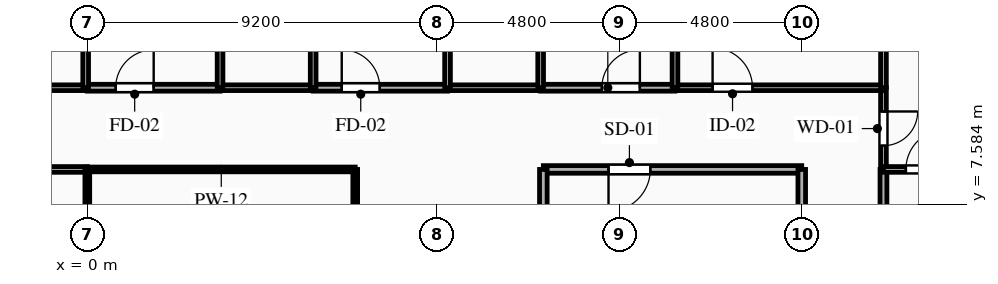
"""IFC4 building model, lengths in metres.
Left out: names, types, materials, properties, quantities, classifications, styles, units other than length and angle.
Written with IfcOpenShell. Run it as: python <this file> out.ifc"""

import sys

from ifc_helpers import new_model, si_unit, direction, frame, frame_2d, origin, place, context, subcontext, project, spatial, rectangle, extrude, element, fill, save


model = new_model("IFC4")
c1 = context("Model", 3, precision=1e-05, world=origin(), true_north=direction((0.0, 1.0)))
c2 = subcontext(c1, "Body", "Model", "MODEL_VIEW")
j1 = project(units=[si_unit("LENGTHUNIT", "METRE"), si_unit("PLANEANGLEUNIT", "RADIAN")], contexts=[c1])
p1 = place(None, origin())
s1 = spatial("IfcSite", under=j1, at=p1, CompositionType="ELEMENT")
p2 = place(p1, origin())
s2 = spatial("IfcBuilding", under=s1, at=p2, CompositionType="ELEMENT")
p3 = place(p2, frame((0.0, 0.0, 137.7)))
s3 = spatial("IfcBuildingStorey", under=s2, at=p3, CompositionType="ELEMENT", Elevation=137.7)
p4 = place(p3, frame((18.8, 8.5, 0.0), z_axis=(0.0, 0.0, 1.0), x_axis=(-1.0, 0.0, 0.0)))
e1 = element("IfcWall", 1, at=p4, inside=s3, PredefinedType="PARTITIONING", context=c2, shape_type="SweptSolid", body=[
    extrude(rectangle(XDim=6.8, YDim=0.2, at=frame_2d((3.4, 0.0))), origin(), (0.0, 0.0, 1.0), 3.04),
])
p5 = place(p4, frame((3.985, 0.0, 0.0)))
e2 = element("IfcOpeningElement", 2, at=p5, cuts=e1, PredefinedType="OPENING", context=c2, shape_type="SweptSolid", body=[
    extrude(rectangle(XDim=1.1, YDim=2.15, at=frame_2d((0.55, 1.075))), frame((0.0, 0.11, 0.0), z_axis=(0.0, -1.0, 0.0), x_axis=(1.0, 0.0, 0.0)), (0.0, 0.0, 1.0), 0.22),
])
p6 = place(p3, frame((18.8, 5.6, 0.0), z_axis=(0.0, 0.0, 1.0), x_axis=(0.0, 1.0, 0.0)))
e3 = element("IfcWall", 3, at=p6, inside=s3, PredefinedType="PARTITIONING", context=c2, shape_type="SweptSolid", body=[
    extrude(rectangle(XDim=2.9, YDim=0.2, at=frame_2d((1.45, 0.0))), origin(), (0.0, 0.0, 1.0), 2.525),
])
p7 = place(p3, frame((12.0, 8.5, 0.0), z_axis=(0.0, 0.0, 1.0), x_axis=(0.0, -1.0, 0.0)))
e4 = element("IfcWall", 4, at=p7, inside=s3, PredefinedType="PARTITIONING", context=c2, shape_type="SweptSolid", body=[
    extrude(rectangle(XDim=2.9, YDim=0.2, at=frame_2d((1.45, 0.0))), origin(), (0.0, 0.0, 1.0), 3.04),
])
p8 = place(p3, frame((-2.493, 10.65, 0.0), z_axis=(0.0, 0.0, 1.0), x_axis=(1.0, 0.0, 0.0)))
e5 = element("IfcWall", 5, at=p8, inside=s3, PredefinedType="PLUMBINGWALL", context=c2, shape_type="SweptSolid", body=[
    extrude(rectangle(XDim=2.45, YDim=0.15, at=frame_2d((1.225, 0.0))), origin(), (0.0, 0.0, 1.0), 3.04),
])
p9 = place(p3, frame((0.0, 8.5, 0.0), z_axis=(0.0, 0.0, 1.0), x_axis=(-1.0, 0.0, 0.0)))
e6 = element("IfcWall", 6, at=p9, inside=s3, PredefinedType="PARTITIONING", context=c2, shape_type="SweptSolid", body=[
    extrude(rectangle(XDim=7.05, YDim=0.15, at=frame_2d((3.525, 0.0))), origin(), (0.0, 0.0, 1.0), 3.04),
])
p10 = place(p3, frame((20.95, 10.65, 0.0), z_axis=(0.0, 0.0, 1.0), x_axis=(0.0, -1.0, 0.0)))
e7 = element("IfcWall", 7, at=p10, inside=s3, PredefinedType="PARTITIONING", context=c2, shape_type="SweptSolid", body=[
    extrude(rectangle(XDim=2.15, YDim=0.15, at=frame_2d((1.075, 0.0))), origin(), (0.0, 0.0, 1.0), 3.04),
])
p11 = place(p10, frame((0.625, 0.0, 0.0)))
e8 = element("IfcOpeningElement", 8, at=p11, cuts=e7, PredefinedType="OPENING", context=c2, shape_type="SweptSolid", body=[
    extrude(rectangle(XDim=0.9, YDim=2.1, at=frame_2d((0.45, 1.05))), frame((0.0, 0.085, 0.0), z_axis=(0.0, -1.0, 0.0), x_axis=(1.0, 0.0, 0.0)), (0.0, 0.0, 1.0), 0.17),
])
p12 = place(p3, frame((0.0, 10.65, 0.0), z_axis=(0.0, 0.0, 1.0), x_axis=(1.0, 0.0, 0.0)))
e9 = element("IfcWall", 9, at=p12, inside=s3, PredefinedType="PARTITIONING", context=c2, shape_type="SweptSolid", body=[
    extrude(rectangle(XDim=3.493, YDim=0.18, at=frame_2d((1.747, 0.0))), origin(), (0.0, 0.0, 1.0), 3.04),
])
p13 = place(p12, frame((0.747, 0.0, 0.0)))
e10 = element("IfcOpeningElement", 10, at=p13, cuts=e9, PredefinedType="OPENING", context=c2, shape_type="SweptSolid", body=[
    extrude(rectangle(XDim=1.0, YDim=2.15, at=frame_2d((0.5, 1.075))), frame((0.0, 0.1, 0.0), z_axis=(0.0, -1.0, 0.0), x_axis=(1.0, 0.0, 0.0)), (0.0, 0.0, 1.0), 0.2),
])
p14 = place(p3, frame((5.943, 10.65, 0.0), z_axis=(0.0, 0.0, 1.0), x_axis=(1.0, 0.0, 0.0)))
e11 = element("IfcWall", 11, at=p14, inside=s3, PredefinedType="PARTITIONING", context=c2, shape_type="SweptSolid", body=[
    extrude(rectangle(XDim=3.536, YDim=0.18, at=frame_2d((1.768, 0.0))), origin(), (0.0, 0.0, 1.0), 3.04),
])
p15 = place(p14, frame((0.752, 0.0, 0.0)))
e12 = element("IfcOpeningElement", 12, at=p15, cuts=e11, PredefinedType="OPENING", context=c2, shape_type="SweptSolid", body=[
    extrude(rectangle(XDim=1.0, YDim=2.15, at=frame_2d((0.5, 1.075))), frame((0.0, 0.1, 0.0), z_axis=(0.0, -1.0, 0.0), x_axis=(1.0, 0.0, 0.0)), (0.0, 0.0, 1.0), 0.2),
])
p16 = place(p3, frame((3.493, 10.65, 0.0), z_axis=(0.0, 0.0, 1.0), x_axis=(1.0, 0.0, 0.0)))
e13 = element("IfcWall", 13, at=p16, inside=s3, PredefinedType="PLUMBINGWALL", context=c2, shape_type="SweptSolid", body=[
    extrude(rectangle(XDim=2.45, YDim=0.15, at=frame_2d((1.225, 0.0))), origin(), (0.0, 0.0, 1.0), 3.04),
])
p17 = place(p3, frame((11.929, 10.65, 0.0), z_axis=(0.0, 0.0, 1.0), x_axis=(1.0, 0.0, 0.0)))
e14 = element("IfcWall", 14, at=p17, inside=s3, PredefinedType="PARTITIONING", context=c2, shape_type="SweptSolid", body=[
    extrude(rectangle(XDim=3.535, YDim=0.18, at=frame_2d((1.768, 0.0))), origin(), (0.0, 0.0, 1.0), 3.04),
])
p18 = place(p17, frame((1.611, 0.0, 0.0)))
e15 = element("IfcOpeningElement", 15, at=p18, cuts=e14, PredefinedType="OPENING", context=c2, shape_type="SweptSolid", body=[
    extrude(rectangle(XDim=1.0, YDim=2.15, at=frame_2d((0.5, 1.075))), frame((0.0, 0.1, 0.0), z_axis=(0.0, -1.0, 0.0), x_axis=(1.0, 0.0, 0.0)), (0.0, 0.0, 1.0), 0.2),
])
p19 = place(p3, frame((9.479, 10.65, 0.0), z_axis=(0.0, 0.0, 1.0), x_axis=(1.0, 0.0, 0.0)))
e16 = element("IfcWall", 16, at=p19, inside=s3, PredefinedType="PLUMBINGWALL", context=c2, shape_type="SweptSolid", body=[
    extrude(rectangle(XDim=2.45, YDim=0.15, at=frame_2d((1.225, 0.0))), origin(), (0.0, 0.0, 1.0), 3.04),
])
p20 = place(p3, frame((15.464, 10.65, 0.0), z_axis=(0.0, 0.0, 1.0), x_axis=(1.0, 0.0, 0.0)))
e17 = element("IfcWall", 17, at=p20, inside=s3, PredefinedType="PARTITIONING", context=c2, shape_type="SweptSolid", body=[
    extrude(rectangle(XDim=5.486, YDim=0.15, at=frame_2d((2.743, 0.0))), origin(), (0.0, 0.0, 1.0), 3.04),
])
p21 = place(p20, frame((0.99, 0.0, 0.0)))
e18 = element("IfcOpeningElement", 18, at=p21, cuts=e17, PredefinedType="OPENING", context=c2, shape_type="SweptSolid", body=[
    extrude(rectangle(XDim=1.05, YDim=2.15, at=frame_2d((0.525, 1.075))), frame((0.0, 0.085, 0.0), z_axis=(0.0, -1.0, 0.0), x_axis=(1.0, 0.0, 0.0)), (0.0, 0.0, 1.0), 0.17),
])
p22 = place(p3, frame((7.05, 8.5, 0.0), z_axis=(0.0, 0.0, 1.0), x_axis=(-1.0, 0.0, 0.0)))
e19 = element("IfcWall", 19, at=p22, inside=s3, PredefinedType="PARTITIONING", context=c2, shape_type="SweptSolid", body=[
    extrude(rectangle(XDim=7.05, YDim=0.125, at=frame_2d((3.525, 0.0))), origin(), (0.0, 0.0, 1.0), 3.04),
])
p23 = place(p3, frame((20.95, 8.5, 0.0), z_axis=(0.0, 0.0, 1.0), x_axis=(0.0, -1.0, 0.0)))
e20 = element("IfcWall", 20, at=p23, inside=s3, PredefinedType="PARTITIONING", context=c2, shape_type="SweptSolid", body=[
    extrude(rectangle(XDim=14.1, YDim=0.18, at=frame_2d((7.05, 0.0))), origin(), (0.0, 0.0, 1.0), 3.04),
])
p24 = place(p23, frame((8.042, 0.0, 0.0)))
e21 = element("IfcOpeningElement", 21, at=p24, cuts=e20, PredefinedType="OPENING", context=c2, shape_type="SweptSolid", body=[
    extrude(rectangle(XDim=1.0, YDim=2.15, at=frame_2d((0.5, 1.075))), frame((0.0, 0.1, 0.0), z_axis=(0.0, -1.0, 0.0), x_axis=(1.0, 0.0, 0.0)), (0.0, 0.0, 1.0), 0.2),
])
p25 = place(p3, frame((7.05, -0.8, 0.0), z_axis=(0.0, 0.0, 1.0), x_axis=(0.0, 1.0, 0.0)))
e22 = element("IfcWall", 22, at=p25, inside=s3, PredefinedType="PARTITIONING", context=c2, shape_type="SweptSolid", body=[
    extrude(rectangle(XDim=9.3, YDim=0.125, at=frame_2d((4.65, 0.0))), origin(), (0.0, 0.0, 1.0), 3.04),
])
p26 = place(p25, frame((1.479, 0.0, 0.0)))
e23 = element("IfcOpeningElement", 23, at=p26, cuts=e22, PredefinedType="OPENING", context=c2, shape_type="SweptSolid", body=[
    extrude(rectangle(XDim=0.95, YDim=2.1, at=frame_2d((0.475, 1.05))), frame((0.0, 0.073, 0.0), z_axis=(0.0, -1.0, 0.0), x_axis=(1.0, 0.0, 0.0)), (0.0, 0.0, 1.0), 0.145),
])
p27 = place(p3, frame((20.95, 8.5, 0.0), z_axis=(0.0, 0.0, 1.0), x_axis=(1.0, 0.0, 0.0)))
e24 = element("IfcWall", 24, at=p27, inside=s3, PredefinedType="PARTITIONING", context=c2, shape_type="SweptSolid", body=[
    extrude(rectangle(XDim=2.23, YDim=0.15, at=frame_2d((1.115, 0.0))), origin(), (0.0, 0.0, 1.0), 3.04),
])
p28 = place(p27, frame((0.59, 0.0, 0.0)))
e25 = element("IfcOpeningElement", 25, at=p28, cuts=e24, PredefinedType="OPENING", context=c2, shape_type="SweptSolid", body=[
    extrude(rectangle(XDim=1.05, YDim=2.15, at=frame_2d((0.525, 1.075))), frame((0.0, 0.085, 0.0), z_axis=(0.0, -1.0, 0.0), x_axis=(1.0, 0.0, 0.0)), (0.0, 0.0, 1.0), 0.17),
])
p29 = place(p3, frame((20.95, 10.65, 0.0), z_axis=(0.0, 0.0, 1.0), x_axis=(0.0, 1.0, 0.0)))
e26 = element("IfcWall", 26, at=p29, inside=s3, PredefinedType="PARTITIONING", context=c2, shape_type="SweptSolid", body=[
    extrude(rectangle(XDim=9.75, YDim=0.15, at=frame_2d((4.875, 0.0))), origin(), (0.0, 0.0, 1.0), 2.525),
])
for number, where, z_axis, x_axis in (
    (27, (-0.043, 10.65, 0.0), (0.0, 0.0, 1.0), (0.0, 1.0, 0.0)),
    (28, (3.493, 12.8, 0.0), (0.0, 0.0, 1.0), (0.0, -1.0, 0.0)),
    (29, (5.943, 10.65, 0.0), (0.0, 0.0, 1.0), (0.0, 1.0, 0.0)),
    (30, (9.479, 12.8, 0.0), (0.0, 0.0, 1.0), (0.0, -1.0, 0.0)),
    (31, (11.929, 10.65, 0.0), (0.0, 0.0, 1.0), (0.0, 1.0, 0.0)),
):
    element("IfcWall", number, at=place(p3, frame(where, z_axis=z_axis, x_axis=x_axis)), inside=s3, PredefinedType="PLUMBINGWALL", context=c2, shape_type="SweptSolid", body=[
        extrude(rectangle(XDim=2.15, YDim=0.15, at=frame_2d((1.075, 0.0))), origin(), (0.0, 0.0, 1.0), 3.04),
    ])
p30 = place(p3, frame((15.464, 20.4, 0.0), z_axis=(0.0, 0.0, 1.0), x_axis=(0.0, -1.0, 0.0)))
e32 = element("IfcWall", 32, at=p30, inside=s3, PredefinedType="PARTITIONING", context=c2, shape_type="SweptSolid", body=[
    extrude(rectangle(XDim=9.75, YDim=0.15, at=frame_2d((4.875, 0.0))), origin(), (0.0, 0.0, 1.0), 2.525),
])
p31 = place(p3, frame((0.0, 8.5, 0.0), z_axis=(0.0, 0.0, 1.0), x_axis=(0.0, -1.0, 0.0)))
e33 = element("IfcWall", 33, at=p31, inside=s3, PredefinedType="PARTITIONING", context=c2, shape_type="SweptSolid", body=[
    extrude(rectangle(XDim=9.3, YDim=0.125, at=frame_2d((4.65, 0.0))), origin(), (0.0, 0.0, 1.0), 3.04),
])
p32 = place(p5, origin())
e34 = element("IfcDoor", 34, at=p32, inside=s3, OperationType="SINGLE_SWING_RIGHT", PredefinedType="DOOR", context=c2, shape_type="SweptSolid", body=[
    extrude(rectangle(XDim=1.1, YDim=2.15, at=frame_2d((0.55, 1.075))), frame((0.0, 0.025, 0.0), z_axis=(0.0, -1.0, 0.0), x_axis=(1.0, 0.0, 0.0)), (0.0, 0.0, 1.0), 0.05),
])
fill(e2, e34)
p33 = place(p11, origin())
e35 = element("IfcDoor", 35, at=p33, inside=s3, OperationType="SINGLE_SWING_LEFT", PredefinedType="DOOR", context=c2, shape_type="SweptSolid", body=[
    extrude(rectangle(XDim=0.9, YDim=2.1, at=frame_2d((0.45, 1.05))), frame((0.0, 0.025, 0.0), z_axis=(0.0, -1.0, 0.0), x_axis=(1.0, 0.0, 0.0)), (0.0, 0.0, 1.0), 0.05),
])
fill(e8, e35)
p34 = place(p13, origin())
e36 = element("IfcDoor", 36, at=p34, inside=s3, OperationType="SINGLE_SWING_RIGHT", PredefinedType="DOOR", context=c2, shape_type="SweptSolid", body=[
    extrude(rectangle(XDim=1.0, YDim=2.15, at=frame_2d((0.5, 1.075))), frame((0.0, 0.025, 0.0), z_axis=(0.0, -1.0, 0.0), x_axis=(1.0, 0.0, 0.0)), (0.0, 0.0, 1.0), 0.05),
])
fill(e10, e36)
p35 = place(p15, origin())
e37 = element("IfcDoor", 37, at=p35, inside=s3, OperationType="SINGLE_SWING_LEFT", PredefinedType="DOOR", context=c2, shape_type="SweptSolid", body=[
    extrude(rectangle(XDim=1.0, YDim=2.15, at=frame_2d((0.5, 1.075))), frame((0.0, 0.025, 0.0), z_axis=(0.0, -1.0, 0.0), x_axis=(1.0, 0.0, 0.0)), (0.0, 0.0, 1.0), 0.05),
])
fill(e12, e37)
p36 = place(p18, origin())
e38 = element("IfcDoor", 38, at=p36, inside=s3, OperationType="SINGLE_SWING_RIGHT", PredefinedType="DOOR", context=c2, shape_type="SweptSolid", body=[
    extrude(rectangle(XDim=1.0, YDim=2.15, at=frame_2d((0.5, 1.075))), frame((0.0, 0.025, 0.0), z_axis=(0.0, -1.0, 0.0), x_axis=(1.0, 0.0, 0.0)), (0.0, 0.0, 1.0), 0.05),
])
fill(e15, e38)
p37 = place(p21, origin())
e39 = element("IfcDoor", 39, at=p37, inside=s3, OperationType="SINGLE_SWING_LEFT", PredefinedType="DOOR", context=c2, shape_type="SweptSolid", body=[
    extrude(rectangle(XDim=1.05, YDim=2.15, at=frame_2d((0.525, 1.075))), frame((0.0, 0.025, 0.0), z_axis=(0.0, -1.0, 0.0), x_axis=(1.0, 0.0, 0.0)), (0.0, 0.0, 1.0), 0.05),
])
fill(e18, e39)
p38 = place(p28, origin())
e40 = element("IfcDoor", 40, at=p38, inside=s3, OperationType="SINGLE_SWING_RIGHT", PredefinedType="DOOR", context=c2, shape_type="SweptSolid", body=[
    extrude(rectangle(XDim=1.05, YDim=2.15, at=frame_2d((0.525, 1.075))), frame((0.0, 0.025, 0.0), z_axis=(0.0, -1.0, 0.0), x_axis=(1.0, 0.0, 0.0)), (0.0, 0.0, 1.0), 0.05),
])
fill(e25, e40)
save(model, sys.argv[1])
